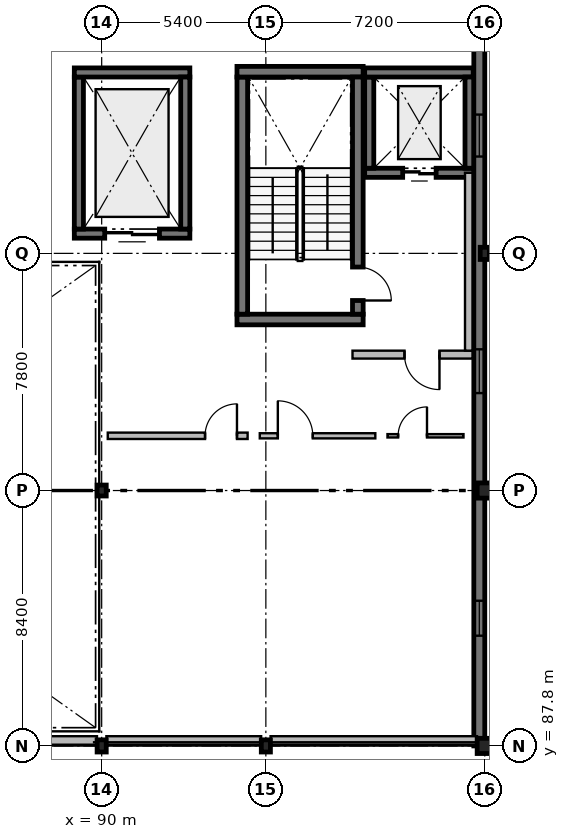
"""IFC4 building model, lengths in metres.
Left out: names, types, materials, properties, quantities, classifications, styles, units other than length and angle.
Written with IfcOpenShell. Run it as: python <this file> out.ifc"""

import sys

from ifc_helpers import new_model, si_unit, direction, frame, frame_2d, origin, origin_2d, place, context, subcontext, project, spatial, rectangle, i_section, extrude, element, fill, save


model = new_model("IFC4")
c1 = context("Model", 3, precision=1e-05, world=origin(), true_north=direction((0.0, 1.0)))
c2 = subcontext(c1, "Body", "Model", "MODEL_VIEW")
j1 = project(units=[si_unit("LENGTHUNIT", "METRE"), si_unit("PLANEANGLEUNIT", "RADIAN")], contexts=[c1])
p1 = place(None, origin())
s1 = spatial("IfcSite", under=j1, at=p1, CompositionType="ELEMENT")
p2 = place(p1, origin())
s2 = spatial("IfcBuilding", under=s1, at=p2, CompositionType="ELEMENT")
p3 = place(p2, frame((0.0, 0.0, 17.1)))
s3 = spatial("IfcBuildingStorey", under=s2, at=p3, CompositionType="ELEMENT", Elevation=17.1)
p4 = place(p3, frame((90.0, 87.8, 0.0), z_axis=(0.0, 0.0, 1.0), x_axis=(1.0, 0.0, 0.0)))
e1 = element("IfcColumn", 1, at=p4, inside=s3, PredefinedType="COLUMN", context=c2, shape_type="SweptSolid", body=[
    extrude(i_section(OverallWidth=0.3, OverallDepth=0.4, WebThickness=0.013, FlangeThickness=0.024, FilletRadius=0.027, at=origin_2d()), origin(), (0.0, 0.0, 1.0), 3.9),
])
p5 = place(p3, frame((90.0, 96.2, 0.0), z_axis=(0.0, 0.0, 1.0), x_axis=(1.0, 0.0, 0.0)))
e2 = element("IfcColumn", 2, at=p5, inside=s3, PredefinedType="COLUMN", context=c2, shape_type="SweptSolid", body=[
    extrude(i_section(OverallWidth=0.3, OverallDepth=0.36, WebThickness=0.012, FlangeThickness=0.022, FilletRadius=0.027, at=origin_2d()), origin(), (0.0, 0.0, 1.0), 3.9),
])
p6 = place(p3, frame((95.4, 87.8, 0.0), z_axis=(0.0, 0.0, 1.0), x_axis=(1.0, 0.0, 0.0)))
e3 = element("IfcColumn", 3, at=p6, inside=s3, PredefinedType="COLUMN", context=c2, shape_type="SweptSolid", body=[
    extrude(i_section(OverallWidth=0.3, OverallDepth=0.4, WebThickness=0.013, FlangeThickness=0.024, FilletRadius=0.027, at=origin_2d()), origin(), (0.0, 0.0, 1.0), 3.9),
])
for number, where, z_axis, x_axis in (
    (4, (102.6, 87.8, 0.0), (0.0, 0.0, 1.0), (1.0, 0.0, 0.0)),
    (5, (102.6, 96.2, 0.0), (0.0, 0.0, 1.0), (1.0, 0.0, 0.0)),
):
    element("IfcColumn", number, at=place(p3, frame(where, z_axis=z_axis, x_axis=x_axis)), inside=s3, PredefinedType="COLUMN", context=c2, shape_type="SweptSolid", body=[
        extrude(rectangle(XDim=0.5, YDim=0.5, at=origin_2d()), origin(), (0.0, 0.0, 1.0), 3.9),
    ])
p7 = place(p3, frame((102.6, 104.0, 0.0), z_axis=(0.0, 0.0, 1.0), x_axis=(1.0, 0.0, 0.0)))
e6 = element("IfcColumn", 6, at=p7, inside=s3, PredefinedType="COLUMN", context=c2, shape_type="SweptSolid", body=[
    extrude(i_section(OverallWidth=0.3, OverallDepth=0.4, WebThickness=0.013, FlangeThickness=0.024, FilletRadius=0.027, at=origin_2d()), origin(), (0.0, 0.0, 1.0), 3.9),
])
p8 = place(p3, frame((98.6, 101.825, 0.0), z_axis=(0.0, 0.0, 1.0), x_axis=(-1.0, 0.0, 0.0)))
e7 = element("IfcWall", 7, at=p8, inside=s3, PredefinedType="SOLIDWALL", context=c2, shape_type="SweptSolid", body=[
    extrude(rectangle(XDim=4.15, YDim=0.35, at=frame_2d((2.075, 0.0))), origin(), (0.0, 0.0, 1.0), 3.9),
])
p9 = place(p3, frame((94.625, 102.0, 0.0), z_axis=(0.0, 0.0, 1.0), x_axis=(0.0, 1.0, 0.0)))
e8 = element("IfcWall", 8, at=p9, inside=s3, PredefinedType="SOLIDWALL", context=c2, shape_type="SweptSolid", body=[
    extrude(rectangle(XDim=7.8, YDim=0.35, at=frame_2d((3.9, 0.0))), origin(), (0.0, 0.0, 1.0), 3.9),
])
p10 = place(p3, frame((94.45, 109.975, 0.0), z_axis=(0.0, 0.0, 1.0), x_axis=(1.0, 0.0, 0.0)))
e9 = element("IfcWall", 9, at=p10, inside=s3, PredefinedType="SOLIDWALL", context=c2, shape_type="SweptSolid", body=[
    extrude(rectangle(XDim=4.15, YDim=0.35, at=frame_2d((2.075, 0.0))), origin(), (0.0, 0.0, 1.0), 3.9),
])
p11 = place(p3, frame((98.425, 109.8, 0.0), z_axis=(0.0, 0.0, 1.0), x_axis=(0.0, -1.0, 0.0)))
e10 = element("IfcWall", 10, at=p11, inside=s3, PredefinedType="SOLIDWALL", context=c2, shape_type="SweptSolid", body=[
    extrude(rectangle(XDim=7.8, YDim=0.35, at=frame_2d((3.9, 0.0))), origin(), (0.0, 0.0, 1.0), 3.9),
])
p12 = place(p11, frame((6.25, 0.0, 0.0)))
e11 = element("IfcOpeningElement", 11, at=p12, cuts=e10, PredefinedType="OPENING", context=c2, shape_type="SweptSolid", body=[
    extrude(rectangle(XDim=1.1, YDim=2.15, at=frame_2d((0.55, 1.075))), frame((0.0, 0.195, 0.0), z_axis=(0.0, -1.0, 0.0), x_axis=(1.0, 0.0, 0.0)), (0.0, 0.0, 1.0), 0.39),
])
p13 = place(p3, frame((102.25, 106.65, 0.0), z_axis=(0.0, 0.0, 1.0), x_axis=(-1.0, 0.0, 0.0)))
e12 = element("IfcWall", 12, at=p13, inside=s3, PredefinedType="SOLIDWALL", context=c2, shape_type="SweptSolid", body=[
    extrude(rectangle(XDim=3.6, YDim=0.3, at=frame_2d((1.8, 0.0))), origin(), (0.0, 0.0, 1.0), 3.9),
])
p14 = place(p13, frame((1.25, 0.0, 0.0)))
e13 = element("IfcOpeningElement", 13, at=p14, cuts=e12, PredefinedType="OPENING", context=c2, shape_type="SweptSolid", body=[
    extrude(rectangle(XDim=1.1, YDim=2.1, at=frame_2d((0.55, 1.05))), frame((0.0, 0.17, 0.0), z_axis=(0.0, -1.0, 0.0), x_axis=(1.0, 0.0, 0.0)), (0.0, 0.0, 1.0), 0.34),
])
p15 = place(p3, frame((98.8, 106.8, 0.0), z_axis=(0.0, 0.0, 1.0), x_axis=(0.0, 1.0, 0.0)))
e14 = element("IfcWall", 14, at=p15, inside=s3, PredefinedType="SOLIDWALL", context=c2, shape_type="SweptSolid", body=[
    extrude(rectangle(XDim=3.0, YDim=0.3, at=frame_2d((1.5, 0.0))), origin(), (0.0, 0.0, 1.0), 3.9),
])
p16 = place(p3, frame((98.65, 109.95, 0.0), z_axis=(0.0, 0.0, 1.0), x_axis=(1.0, 0.0, 0.0)))
e15 = element("IfcWall", 15, at=p16, inside=s3, PredefinedType="SOLIDWALL", context=c2, shape_type="SweptSolid", body=[
    extrude(rectangle(XDim=3.57, YDim=0.3, at=frame_2d((1.785, 0.0))), origin(), (0.0, 0.0, 1.0), 3.9),
])
p17 = place(p3, frame((102.1, 109.8, 0.0), z_axis=(0.0, 0.0, 1.0), x_axis=(0.0, -1.0, 0.0)))
e16 = element("IfcWall", 16, at=p17, inside=s3, PredefinedType="SOLIDWALL", context=c2, shape_type="SweptSolid", body=[
    extrude(rectangle(XDim=3.0, YDim=0.3, at=frame_2d((1.5, 0.0))), origin(), (0.0, 0.0, 1.0), 3.9),
])
p18 = place(p3, frame((102.21, 100.67, 0.0), z_axis=(0.0, 0.0, 1.0), x_axis=(-1.0, 0.0, 0.0)))
e17 = element("IfcWall", 17, at=p18, inside=s3, PredefinedType="SOLIDWALL", context=c2, shape_type="SweptSolid", body=[
    extrude(rectangle(XDim=3.96, YDim=0.26, at=frame_2d((1.98, 0.0))), origin(), (0.0, 0.0, 1.0), 3.68),
])
p19 = place(p18, frame((1.1, 0.0, 0.0)))
e18 = element("IfcOpeningElement", 18, at=p19, cuts=e17, PredefinedType="OPENING", context=c2, shape_type="SweptSolid", body=[
    extrude(rectangle(XDim=1.15, YDim=2.2, at=frame_2d((0.575, 1.1))), frame((0.0, 0.15, 0.0), z_axis=(0.0, -1.0, 0.0), x_axis=(1.0, 0.0, 0.0)), (0.0, 0.0, 1.0), 0.3),
])
p20 = place(p3, frame((102.08, 106.65, 0.0), z_axis=(0.0, 0.0, 1.0), x_axis=(0.0, -1.0, 0.0)))
e19 = element("IfcWall", 19, at=p20, inside=s3, PredefinedType="SOLIDWALL", context=c2, shape_type="SweptSolid", body=[
    extrude(rectangle(XDim=5.85, YDim=0.26, at=frame_2d((2.925, 0.0))), origin(), (0.0, 0.0, 1.0), 3.68),
])
p21 = place(p3, frame((92.9, 104.65, 0.0), z_axis=(0.0, 0.0, 1.0), x_axis=(-1.0, 0.0, 0.0)))
e20 = element("IfcWall", 20, at=p21, inside=s3, PredefinedType="SOLIDWALL", context=c2, shape_type="SweptSolid", body=[
    extrude(rectangle(XDim=3.8, YDim=0.3, at=frame_2d((1.9, 0.0))), origin(), (0.0, 0.0, 1.0), 3.9),
])
p22 = place(p21, frame((1.0, 0.0, 0.0)))
e21 = element("IfcOpeningElement", 21, at=p22, cuts=e20, PredefinedType="OPENING", context=c2, shape_type="SweptSolid", body=[
    extrude(rectangle(XDim=1.8, YDim=2.4, at=frame_2d((0.9, 1.2))), frame((0.0, 0.17, 0.0), z_axis=(0.0, -1.0, 0.0), x_axis=(1.0, 0.0, 0.0)), (0.0, 0.0, 1.0), 0.34),
])
p23 = place(p3, frame((89.25, 104.8, 0.0), z_axis=(0.0, 0.0, 1.0), x_axis=(0.0, 1.0, 0.0)))
e22 = element("IfcWall", 22, at=p23, inside=s3, PredefinedType="SOLIDWALL", context=c2, shape_type="SweptSolid", body=[
    extrude(rectangle(XDim=5.0, YDim=0.3, at=frame_2d((2.5, 0.0))), origin(), (0.0, 0.0, 1.0), 3.9),
])
p24 = place(p3, frame((89.1, 109.95, 0.0), z_axis=(0.0, 0.0, 1.0), x_axis=(1.0, 0.0, 0.0)))
e23 = element("IfcWall", 23, at=p24, inside=s3, PredefinedType="SOLIDWALL", context=c2, shape_type="SweptSolid", body=[
    extrude(rectangle(XDim=3.8, YDim=0.3, at=frame_2d((1.9, 0.0))), origin(), (0.0, 0.0, 1.0), 3.9),
])
p25 = place(p3, frame((92.75, 109.8, 0.0), z_axis=(0.0, 0.0, 1.0), x_axis=(0.0, -1.0, 0.0)))
e24 = element("IfcWall", 24, at=p25, inside=s3, PredefinedType="SOLIDWALL", context=c2, shape_type="SweptSolid", body=[
    extrude(rectangle(XDim=5.0, YDim=0.3, at=frame_2d((2.5, 0.0))), origin(), (0.0, 0.0, 1.0), 3.9),
])
p26 = place(p3, frame((102.42, 87.8, 0.0), z_axis=(0.0, 0.0, 1.0), x_axis=(0.0, 1.0, 0.0)))
e25 = element("IfcWall", 25, at=p26, inside=s3, PredefinedType="SOLIDWALL", context=c2, shape_type="SweptSolid", body=[
    extrude(rectangle(XDim=24.0, YDim=0.36, at=frame_2d((12.0, 0.0))), origin(), (0.0, 0.0, 1.0), 3.65),
])
p27 = place(p26, frame((3.625, 0.0, 0.95)))
e26 = element("IfcOpeningElement", 26, at=p27, cuts=e25, PredefinedType="OPENING", context=c2, shape_type="SweptSolid", body=[
    extrude(rectangle(XDim=1.15, YDim=1.95, at=frame_2d((0.575, 0.975))), frame((0.0, 0.2, 0.0), z_axis=(0.0, -1.0, 0.0), x_axis=(1.0, 0.0, 0.0)), (0.0, 0.0, 1.0), 0.4),
])
p28 = place(p26, frame((11.605, 0.0, 0.95)))
e27 = element("IfcOpeningElement", 27, at=p28, cuts=e25, PredefinedType="OPENING", context=c2, shape_type="SweptSolid", body=[
    extrude(rectangle(XDim=1.44, YDim=1.7, at=frame_2d((0.72, 0.85))), frame((0.0, 0.2, 0.0), z_axis=(0.0, -1.0, 0.0), x_axis=(1.0, 0.0, 0.0)), (0.0, 0.0, 1.0), 0.4),
])
p29 = place(p26, frame((19.385, 0.0, 0.95)))
e28 = element("IfcOpeningElement", 28, at=p29, cuts=e25, PredefinedType="OPENING", context=c2, shape_type="SweptSolid", body=[
    extrude(rectangle(XDim=1.38, YDim=1.95, at=frame_2d((0.69, 0.975))), frame((0.0, 0.2, 0.0), z_axis=(0.0, -1.0, 0.0), x_axis=(1.0, 0.0, 0.0)), (0.0, 0.0, 1.0), 0.4),
])
p30 = place(p3, frame((84.755, 87.98, 2.165), z_axis=(0.0, 0.0, 1.0), x_axis=(1.0, 0.0, 0.0)))
e29 = element("IfcWall", 29, at=p30, inside=s3, PredefinedType="SOLIDWALL", context=c2, shape_type="SweptSolid", body=[
    extrude(rectangle(XDim=5.09, YDim=0.28, at=frame_2d((2.545, 0.0))), origin(), (0.0, 0.0, 1.0), 1.108),
])
p31 = place(p3, frame((90.155, 87.98, 0.08), z_axis=(0.0, 0.0, 1.0), x_axis=(1.0, 0.0, 0.0)))
e30 = element("IfcWall", 30, at=p31, inside=s3, PredefinedType="SOLIDWALL", context=c2, shape_type="SweptSolid", body=[
    extrude(rectangle(XDim=5.09, YDim=0.28, at=frame_2d((2.545, 0.0))), origin(), (0.0, 0.0, 1.0), 3.193),
])
p32 = place(p3, frame((95.555, 87.98, 0.0), z_axis=(0.0, 0.0, 1.0), x_axis=(1.0, 0.0, 0.0)))
e31 = element("IfcWall", 31, at=p32, inside=s3, PredefinedType="SOLIDWALL", context=c2, shape_type="SweptSolid", body=[
    extrude(rectangle(XDim=6.79, YDim=0.28, at=frame_2d((3.395, 0.0))), origin(), (0.0, 0.0, 1.0), 3.013),
])
p33 = place(p3, frame((90.2, 98.0, 0.0), z_axis=(0.0, 0.0, 1.0), x_axis=(1.0, 0.0, 0.0)))
e32 = element("IfcWall", 32, at=p33, inside=s3, PredefinedType="PARTITIONING", context=c2, shape_type="SweptSolid", body=[
    extrude(rectangle(XDim=4.6, YDim=0.21, at=frame_2d((2.3, 0.0))), origin(), (0.0, 0.0, 1.0), 3.68),
])
p34 = place(p33, frame((3.2, 0.0, 0.0)))
e33 = element("IfcOpeningElement", 33, at=p34, cuts=e32, PredefinedType="OPENING", context=c2, shape_type="SweptSolid", body=[
    extrude(rectangle(XDim=1.05, YDim=2.25, at=frame_2d((0.525, 1.125))), frame((0.0, 0.125, 0.0), z_axis=(0.0, -1.0, 0.0), x_axis=(1.0, 0.0, 0.0)), (0.0, 0.0, 1.0), 0.25),
])
p35 = place(p3, frame((95.2, 98.0, 0.0), z_axis=(0.0, 0.0, 1.0), x_axis=(1.0, 0.0, 0.0)))
e34 = element("IfcWall", 34, at=p35, inside=s3, PredefinedType="PARTITIONING", context=c2, shape_type="SweptSolid", body=[
    extrude(rectangle(XDim=3.8, YDim=0.17, at=frame_2d((1.9, 0.0))), origin(), (0.0, 0.0, 1.0), 3.68),
])
p36 = place(p35, frame((0.594, 0.0, 0.0)))
e35 = element("IfcOpeningElement", 35, at=p36, cuts=e34, PredefinedType="OPENING", context=c2, shape_type="SweptSolid", body=[
    extrude(rectangle(XDim=1.15, YDim=2.15, at=frame_2d((0.575, 1.075))), frame((0.0, 0.105, 0.0), z_axis=(0.0, -1.0, 0.0), x_axis=(1.0, 0.0, 0.0)), (0.0, 0.0, 1.0), 0.21),
])
p37 = place(p3, frame((99.4, 98.0, 0.0), z_axis=(0.0, 0.0, 1.0), x_axis=(1.0, 0.0, 0.0)))
e36 = element("IfcWall", 36, at=p37, inside=s3, PredefinedType="PARTITIONING", context=c2, shape_type="SweptSolid", body=[
    extrude(rectangle(XDim=2.5, YDim=0.11, at=frame_2d((1.25, 0.0))), origin(), (0.0, 0.0, 1.0), 3.68),
])
p38 = place(p37, frame((0.35, 0.0, 0.0)))
e37 = element("IfcOpeningElement", 37, at=p38, cuts=e36, PredefinedType="OPENING", context=c2, shape_type="SweptSolid", body=[
    extrude(rectangle(XDim=0.95, YDim=2.1, at=frame_2d((0.475, 1.05))), frame((0.0, 0.075, 0.0), z_axis=(0.0, -1.0, 0.0), x_axis=(1.0, 0.0, 0.0)), (0.0, 0.0, 1.0), 0.15),
])
p39 = place(p12, origin())
e38 = element("IfcDoor", 38, at=p39, inside=s3, OperationType="SINGLE_SWING_RIGHT", PredefinedType="DOOR", context=c2, shape_type="SweptSolid", body=[
    extrude(rectangle(XDim=1.1, YDim=2.15, at=frame_2d((0.55, 1.075))), frame((0.0, 0.025, 0.0), z_axis=(0.0, -1.0, 0.0), x_axis=(1.0, 0.0, 0.0)), (0.0, 0.0, 1.0), 0.05),
])
fill(e11, e38)
p40 = place(p14, origin())
e39 = element("IfcDoor", 39, at=p40, inside=s3, OperationType="DOUBLE_DOOR_SLIDING", PredefinedType="DOOR", context=c2, shape_type="SweptSolid", body=[
    extrude(rectangle(XDim=1.1, YDim=2.1, at=frame_2d((0.55, 1.05))), frame((0.0, 0.025, 0.0), z_axis=(0.0, -1.0, 0.0), x_axis=(1.0, 0.0, 0.0)), (0.0, 0.0, 1.0), 0.05),
])
fill(e13, e39)
p41 = place(p19, origin())
e40 = element("IfcDoor", 40, at=p41, inside=s3, OperationType="SINGLE_SWING_LEFT", PredefinedType="DOOR", context=c2, shape_type="SweptSolid", body=[
    extrude(rectangle(XDim=1.15, YDim=2.2, at=frame_2d((0.575, 1.1))), frame((0.0, 0.025, 0.0), z_axis=(0.0, -1.0, 0.0), x_axis=(1.0, 0.0, 0.0)), (0.0, 0.0, 1.0), 0.05),
])
fill(e18, e40)
p42 = place(p22, origin())
e41 = element("IfcDoor", 41, at=p42, inside=s3, OperationType="DOUBLE_DOOR_SLIDING", PredefinedType="DOOR", context=c2, shape_type="SweptSolid", body=[
    extrude(rectangle(XDim=1.8, YDim=2.4, at=frame_2d((0.9, 1.2))), frame((0.0, 0.025, 0.0), z_axis=(0.0, -1.0, 0.0), x_axis=(1.0, 0.0, 0.0)), (0.0, 0.0, 1.0), 0.05),
])
fill(e21, e41)
p43 = place(p27, origin())
e42 = element("IfcWindow", 42, at=p43, inside=s3, PartitioningType="SINGLE_PANEL", PredefinedType="WINDOW", context=c2, shape_type="SweptSolid", body=[
    extrude(rectangle(XDim=1.15, YDim=1.95, at=frame_2d((0.575, 0.975))), frame((0.0, 0.03, 0.0), z_axis=(0.0, -1.0, 0.0), x_axis=(1.0, 0.0, 0.0)), (0.0, 0.0, 1.0), 0.06),
])
fill(e26, e42)
p44 = place(p28, origin())
e43 = element("IfcWindow", 43, at=p44, inside=s3, PartitioningType="SINGLE_PANEL", PredefinedType="WINDOW", context=c2, shape_type="SweptSolid", body=[
    extrude(rectangle(XDim=1.44, YDim=1.7, at=frame_2d((0.72, 0.85))), frame((0.0, 0.03, 0.0), z_axis=(0.0, -1.0, 0.0), x_axis=(1.0, 0.0, 0.0)), (0.0, 0.0, 1.0), 0.06),
])
fill(e27, e43)
p45 = place(p29, origin())
e44 = element("IfcWindow", 44, at=p45, inside=s3, PartitioningType="SINGLE_PANEL", PredefinedType="WINDOW", context=c2, shape_type="SweptSolid", body=[
    extrude(rectangle(XDim=1.38, YDim=1.95, at=frame_2d((0.69, 0.975))), frame((0.0, 0.03, 0.0), z_axis=(0.0, -1.0, 0.0), x_axis=(1.0, 0.0, 0.0)), (0.0, 0.0, 1.0), 0.06),
])
fill(e28, e44)
p46 = place(p34, origin())
e45 = element("IfcDoor", 45, at=p46, inside=s3, OperationType="SINGLE_SWING_RIGHT", PredefinedType="DOOR", context=c2, shape_type="SweptSolid", body=[
    extrude(rectangle(XDim=1.05, YDim=2.25, at=frame_2d((0.525, 1.125))), frame((0.0, 0.025, 0.0), z_axis=(0.0, -1.0, 0.0), x_axis=(1.0, 0.0, 0.0)), (0.0, 0.0, 1.0), 0.05),
])
fill(e33, e45)
p47 = place(p36, origin())
e46 = element("IfcDoor", 46, at=p47, inside=s3, OperationType="SINGLE_SWING_LEFT", PredefinedType="DOOR", context=c2, shape_type="SweptSolid", body=[
    extrude(rectangle(XDim=1.15, YDim=2.15, at=frame_2d((0.575, 1.075))), frame((0.0, 0.025, 0.0), z_axis=(0.0, -1.0, 0.0), x_axis=(1.0, 0.0, 0.0)), (0.0, 0.0, 1.0), 0.05),
])
fill(e35, e46)
p48 = place(p38, origin())
e47 = element("IfcDoor", 47, at=p48, inside=s3, OperationType="SINGLE_SWING_RIGHT", PredefinedType="DOOR", context=c2, shape_type="SweptSolid", body=[
    extrude(rectangle(XDim=0.95, YDim=2.1, at=frame_2d((0.475, 1.05))), frame((0.0, 0.025, 0.0), z_axis=(0.0, -1.0, 0.0), x_axis=(1.0, 0.0, 0.0)), (0.0, 0.0, 1.0), 0.05),
])
fill(e37, e47)
save(model, sys.argv[1])
